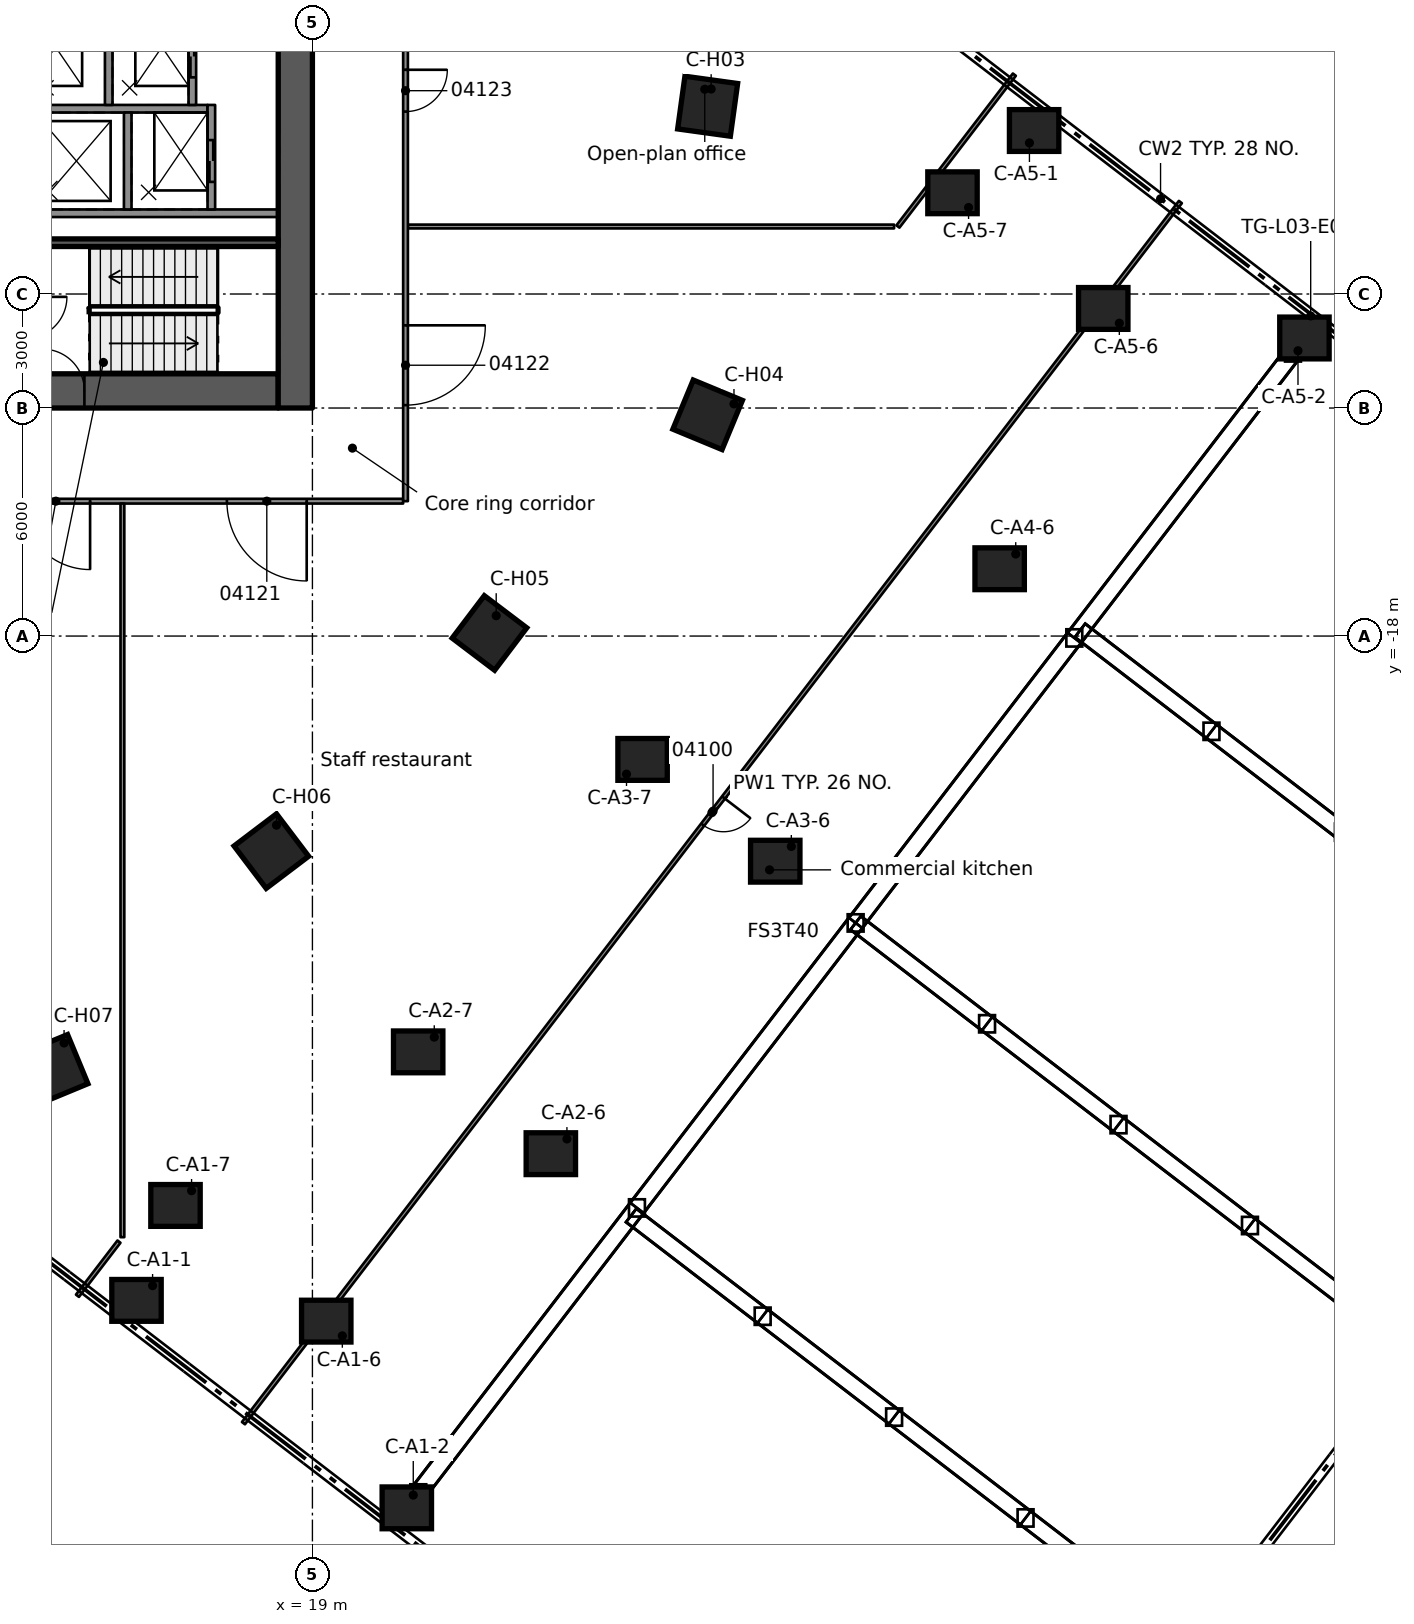
"""IFC4 building model, lengths in metres.
Left out: names, types, materials, properties, quantities, classifications, styles, units other than length and angle.
Written with IfcOpenShell. Run it as: python <this file> out.ifc"""

import sys

from ifc_helpers import new_model, si_unit, direction, frame, frame_2d, origin, origin_2d, place, context, subcontext, project, spatial, rectangle, extrude, element, fill, save


model = new_model("IFC4")
c1 = context("Model", 3, precision=1e-05, world=origin(), true_north=direction((0.0, 1.0)))
c2 = subcontext(c1, "Body", "Model", "MODEL_VIEW")
j1 = project(units=[si_unit("LENGTHUNIT", "METRE"), si_unit("PLANEANGLEUNIT", "RADIAN")], contexts=[c1])
p1 = place(None, origin())
s1 = spatial("IfcSite", under=j1, at=p1, CompositionType="ELEMENT")
p2 = place(p1, origin())
s2 = spatial("IfcBuilding", under=s1, at=p2, CompositionType="ELEMENT")
p3 = place(p2, frame((0.0, 0.0, 20.5)))
s3 = spatial("IfcBuildingStorey", under=s2, at=p3, CompositionType="ELEMENT", Elevation=20.5)
p4 = place(p3, frame((8.9, -11.55, 0.0), z_axis=(0.0, 0.0, 1.0), x_axis=(1.0, 0.0, 0.0)))
e1 = element("IfcWall", 1, at=p4, inside=s3, PredefinedType="SHEAR", context=c2, shape_type="SweptSolid", body=[
    extrude(rectangle(XDim=9.2, YDim=0.9, at=frame_2d((4.6, 0.0))), origin(), (0.0, 0.0, 1.0), 4.6),
])
p5 = place(p4, frame((3.0, 0.0, 0.0)))
e2 = element("IfcOpeningElement", 2, at=p5, cuts=e1, PredefinedType="OPENING", context=c2, shape_type="SweptSolid", body=[
    extrude(rectangle(XDim=1.1, YDim=2.1, at=frame_2d((0.55, 1.05))), frame((0.0, 0.46, 0.0), z_axis=(0.0, -1.0, 0.0), x_axis=(1.0, 0.0, 0.0)), (0.0, 0.0, 1.0), 0.92),
])
p6 = place(p3, frame((18.55, -12.0, 0.0), z_axis=(0.0, 0.0, 1.0), x_axis=(0.0, 1.0, 0.0)))
e3 = element("IfcWall", 3, at=p6, inside=s3, PredefinedType="SHEAR", context=c2, shape_type="SweptSolid", body=[
    extrude(rectangle(XDim=24.0, YDim=0.9, at=frame_2d((12.0, 0.0))), origin(), (0.0, 0.0, 1.0), 4.6),
])
p7 = place(p6, frame((12.1, 0.0, 0.0)))
e4 = element("IfcOpeningElement", 4, at=p7, cuts=e3, PredefinedType="OPENING", context=c2, shape_type="SweptSolid", body=[
    extrude(rectangle(XDim=1.8, YDim=2.1, at=frame_2d((0.9, 1.05))), frame((0.0, 0.46, 0.0), z_axis=(0.0, -1.0, 0.0), x_axis=(1.0, 0.0, 0.0)), (0.0, 0.0, 1.0), 0.92),
])
for number, where, z_axis, x_axis in (
    (5, (14.371, -35.48, 0.0), (0.0, 0.0, 1.0), (1.0, 0.0, 0.0)),
    (6, (21.484, -40.939, 0.0), (0.0, 0.0, 1.0), (1.0, 0.0, 0.0)),
    (7, (19.364, -36.026, 0.0), (0.0, 0.0, 1.0), (1.0, 0.0, 0.0)),
    (8, (15.397, -32.982, 0.0), (0.0, 0.0, 1.0), (1.0, 0.0, 0.0)),
    (9, (25.274, -31.62, 0.0), (0.0, 0.0, 1.0), (1.0, 0.0, 0.0)),
    (10, (21.783, -28.941, 0.0), (0.0, 0.0, 1.0), (1.0, 0.0, 0.0)),
    (11, (31.179, -23.924, 0.0), (0.0, 0.0, 1.0), (1.0, 0.0, 0.0)),
    (12, (27.688, -21.246, 0.0), (0.0, 0.0, 1.0), (1.0, 0.0, 0.0)),
    (13, (37.084, -16.229, 0.0), (0.0, 0.0, 1.0), (1.0, 0.0, 0.0)),
    (14, (37.991, -4.698, 0.0), (0.0, 0.0, 1.0), (1.0, 0.0, 0.0)),
    (15, (45.104, -10.157, 0.0), (0.0, 0.0, 1.0), (1.0, 0.0, 0.0)),
    (16, (39.81, -9.38, 0.0), (0.0, 0.0, 1.0), (1.0, 0.0, 0.0)),
    (17, (35.843, -6.336, 0.0), (0.0, 0.0, 1.0), (1.0, 0.0, 0.0)),
):
    element("IfcColumn", number, at=place(p3, frame(where, z_axis=z_axis, x_axis=x_axis)), inside=s3, PredefinedType="COLUMN", context=c2, shape_type="SweptSolid", body=[
        extrude(rectangle(XDim=1.3, YDim=1.1, at=origin_2d()), origin(), (0.0, 0.0, 1.0), 4.6),
    ])
for number, where, z_axis, x_axis in (
    (18, (29.4, -4.059, 0.0), (0.0, 0.0, 1.0), (0.991, -0.137, 0.0)),
    (19, (29.4, -12.178, 0.0), (0.0, 0.0, 1.0), (0.924, -0.383, 0.0)),
    (20, (23.659, -17.919, 0.0), (0.0, 0.0, 1.0), (0.797, -0.604, 0.0)),
    (21, (17.919, -23.659, 0.0), (0.0, 0.0, 1.0), (0.604, -0.797, 0.0)),
    (22, (12.178, -29.4, 0.0), (0.0, 0.0, 1.0), (0.383, -0.924, 0.0)),
):
    element("IfcColumn", number, at=place(p3, frame(where, z_axis=z_axis, x_axis=x_axis)), inside=s3, PredefinedType="COLUMN", context=c2, shape_type="SweptSolid", body=[
        extrude(rectangle(XDim=1.4, YDim=1.4, at=origin_2d()), origin(), (0.0, 0.0, 1.0), 4.6),
    ])
p8 = place(p3, frame((11.54, -6.875, 0.0), z_axis=(0.0, 0.0, 1.0), x_axis=(1.0, 0.0, 0.0)))
e23 = element("IfcWall", 23, at=p8, inside=s3, PredefinedType="SOLIDWALL", context=c2, shape_type="SweptSolid", body=[
    extrude(rectangle(XDim=6.56, YDim=0.2, at=frame_2d((3.28, 0.0))), origin(), (0.0, 0.0, 1.0), 4.18),
])
p9 = place(p3, frame((11.54, -4.125, 0.0), z_axis=(0.0, 0.0, 1.0), x_axis=(1.0, 0.0, 0.0)))
e24 = element("IfcWall", 24, at=p9, inside=s3, PredefinedType="SOLIDWALL", context=c2, shape_type="SweptSolid", body=[
    extrude(rectangle(XDim=4.7, YDim=0.2, at=frame_2d((2.35, 0.0))), origin(), (0.0, 0.0, 1.0), 4.18),
])
for number, where, z_axis, x_axis in (
    (25, (13.64, -1.475, 0.0), (0.0, 0.0, 1.0), (0.0, -1.0, 0.0)),
    (26, (14.14, -4.225, 0.0), (0.0, 0.0, 1.0), (0.0, -1.0, 0.0)),
):
    element("IfcWall", number, at=place(p3, frame(where, z_axis=z_axis, x_axis=x_axis)), inside=s3, PredefinedType="SOLIDWALL", context=c2, shape_type="SweptSolid", body=[
        extrude(rectangle(XDim=2.55, YDim=0.2, at=frame_2d((1.275, 0.0))), origin(), (0.0, 0.0, 1.0), 4.18),
    ])
p10 = place(p3, frame((15.84, 4.025, 0.0), z_axis=(0.0, 0.0, 1.0), x_axis=(0.0, -1.0, 0.0)))
e27 = element("IfcWall", 27, at=p10, inside=s3, PredefinedType="SOLIDWALL", context=c2, shape_type="SweptSolid", body=[
    extrude(rectangle(XDim=8.05, YDim=0.2, at=frame_2d((4.025, 0.0))), origin(), (0.0, 0.0, 1.0), 4.18),
])
p11 = place(p10, frame((3.475, 0.0, 0.0)))
e28 = element("IfcOpeningElement", 28, at=p11, cuts=e27, PredefinedType="OPENING", context=c2, shape_type="SweptSolid", body=[
    extrude(rectangle(XDim=1.1, YDim=2.1, at=frame_2d((0.55, 1.05))), frame((0.0, 0.11, 0.0), z_axis=(0.0, -1.0, 0.0), x_axis=(1.0, 0.0, 0.0)), (0.0, 0.0, 1.0), 0.22),
])
p12 = place(p10, frame((6.225, 0.0, 0.0)))
e29 = element("IfcOpeningElement", 29, at=p12, cuts=e27, PredefinedType="OPENING", context=c2, shape_type="SweptSolid", body=[
    extrude(rectangle(XDim=1.1, YDim=2.1, at=frame_2d((0.55, 1.05))), frame((0.0, 0.11, 0.0), z_axis=(0.0, -1.0, 0.0), x_axis=(1.0, 0.0, 0.0)), (0.0, 0.0, 1.0), 0.22),
])
p13 = place(p3, frame((16.34, -4.025, 0.0), z_axis=(0.0, 0.0, 1.0), x_axis=(0.0, -1.0, 0.0)))
e30 = element("IfcWall", 30, at=p13, inside=s3, PredefinedType="SOLIDWALL", context=c2, shape_type="SweptSolid", body=[
    extrude(rectangle(XDim=2.75, YDim=0.2, at=frame_2d((1.375, 0.0))), origin(), (0.0, 0.0, 1.0), 4.18),
])
p14 = place(p13, frame((0.925, 0.0, 0.0)))
e31 = element("IfcOpeningElement", 31, at=p14, cuts=e30, PredefinedType="OPENING", context=c2, shape_type="SweptSolid", body=[
    extrude(rectangle(XDim=1.1, YDim=2.1, at=frame_2d((0.55, 1.05))), frame((0.0, 0.11, 0.0), z_axis=(0.0, -1.0, 0.0), x_axis=(1.0, 0.0, 0.0)), (0.0, 0.0, 1.0), 0.22),
])
p15 = place(p3, frame((11.54, -7.65, 0.0), z_axis=(0.0, 0.0, 1.0), x_axis=(1.0, 0.0, 0.0)))
e32 = element("IfcWall", 32, at=p15, inside=s3, PredefinedType="SOLIDWALL", context=c2, shape_type="SweptSolid", body=[
    extrude(rectangle(XDim=6.56, YDim=0.2, at=frame_2d((3.28, 0.0))), origin(), (0.0, 0.0, 1.0), 4.18),
])
p16 = place(p3, frame((21.387, -14.451, 0.0), z_axis=(0.0, 0.0, 1.0), x_axis=(-1.0, 0.0, 0.0)))
e33 = element("IfcWall", 33, at=p16, inside=s3, PredefinedType="PARTITIONING", context=c2, shape_type="SweptSolid", body=[
    extrude(rectangle(XDim=10.996, YDim=0.125, at=frame_2d((5.498, 0.0))), origin(), (0.0, 0.0, 1.0), 4.16),
])
p17 = place(p16, frame((8.238, 0.0, 0.0)))
e34 = element("IfcOpeningElement", 34, at=p17, cuts=e33, PredefinedType="OPENING", context=c2, shape_type="SweptSolid", body=[
    extrude(rectangle(XDim=1.8, YDim=2.1, at=frame_2d((0.9, 1.05))), frame((0.0, 0.073, 0.0), z_axis=(0.0, -1.0, 0.0), x_axis=(1.0, 0.0, 0.0)), (0.0, 0.0, 1.0), 0.145),
])
p18 = place(p16, frame((2.538, 0.0, 0.0)))
e35 = element("IfcOpeningElement", 35, at=p18, cuts=e33, PredefinedType="OPENING", context=c2, shape_type="SweptSolid", body=[
    extrude(rectangle(XDim=2.1, YDim=2.1, at=frame_2d((1.05, 1.05))), frame((0.0, 0.073, 0.0), z_axis=(0.0, -1.0, 0.0), x_axis=(1.0, 0.0, 0.0)), (0.0, 0.0, 1.0), 0.145),
])
p19 = place(p3, frame((21.512, -7.224, 0.0), z_axis=(0.0, 0.0, 1.0), x_axis=(1.0, 0.0, 0.0)))
e36 = element("IfcWall", 36, at=p19, inside=s3, PredefinedType="PARTITIONING", context=c2, shape_type="SweptSolid", body=[
    extrude(rectangle(XDim=12.794, YDim=0.1, at=frame_2d((6.397, 0.0))), origin(), (0.0, 0.0, 1.0), 4.16),
])
p20 = place(p3, frame((41.84, -6.58, 0.0), z_axis=(0.0, 0.0, 1.0), x_axis=(-0.608763818445, -0.793351506807, 0.0)))
e37 = element("IfcWall", 37, at=p20, inside=s3, PredefinedType="PARTITIONING", context=c2, shape_type="SweptSolid", body=[
    extrude(rectangle(XDim=40.5, YDim=0.1, at=frame_2d((20.25, 0.0))), origin(), (0.0, 0.0, 1.0), 4.16),
])
p21 = place(p20, frame((19.75, 0.0, 0.0)))
e38 = element("IfcOpeningElement", 38, at=p21, cuts=e37, PredefinedType="OPENING", context=c2, shape_type="SweptSolid", body=[
    extrude(rectangle(XDim=0.9, YDim=2.1, at=frame_2d((0.45, 1.05))), frame((0.0, 0.06, 0.0), z_axis=(0.0, -1.0, 0.0), x_axis=(1.0, 0.0, 0.0)), (0.0, 0.0, 1.0), 0.12),
])
p22 = place(p3, frame((12.817, -35.359, 0.0), z_axis=(0.0, 0.0, 1.0), x_axis=(0.608665559583, 0.793426894287, 0.0)))
e39 = element("IfcWall", 39, at=p22, inside=s3, PredefinedType="PARTITIONING", context=c2, shape_type="SweptSolid", body=[
    extrude(rectangle(XDim=1.796, YDim=0.1, at=frame_2d((0.898, 0.0))), origin(), (0.0, 0.0, 1.0), 4.16),
])
p23 = place(p3, frame((34.407, -7.224, 0.0), z_axis=(0.0, 0.0, 1.0), x_axis=(0.608468185558, 0.793578267825, 0.0)))
e40 = element("IfcWall", 40, at=p23, inside=s3, PredefinedType="PARTITIONING", context=c2, shape_type="SweptSolid", body=[
    extrude(rectangle(XDim=5.036, YDim=0.1, at=frame_2d((2.518, 0.0))), origin(), (0.0, 0.0, 1.0), 4.16),
])
p24 = place(p3, frame((21.45, 14.451, 0.0), z_axis=(0.0, 0.0, 1.0), x_axis=(0.0, -1.0, 0.0)))
e41 = element("IfcWall", 41, at=p24, inside=s3, PredefinedType="PARTITIONING", context=c2, shape_type="SweptSolid", body=[
    extrude(rectangle(XDim=28.902, YDim=0.125, at=frame_2d((14.451, 0.0))), origin(), (0.0, 0.0, 1.0), 4.16),
])
p25 = place(p24, frame((24.275, 0.0, 0.0)))
e42 = element("IfcOpeningElement", 42, at=p25, cuts=e41, PredefinedType="OPENING", context=c2, shape_type="SweptSolid", body=[
    extrude(rectangle(XDim=2.1, YDim=2.1, at=frame_2d((1.05, 1.05))), frame((0.0, 0.073, 0.0), z_axis=(0.0, -1.0, 0.0), x_axis=(1.0, 0.0, 0.0)), (0.0, 0.0, 1.0), 0.145),
])
p26 = place(p24, frame((17.551, 0.0, 0.0)))
e43 = element("IfcOpeningElement", 43, at=p26, cuts=e41, PredefinedType="OPENING", context=c2, shape_type="SweptSolid", body=[
    extrude(rectangle(XDim=1.1, YDim=2.1, at=frame_2d((0.55, 1.05))), frame((0.0, 0.073, 0.0), z_axis=(0.0, -1.0, 0.0), x_axis=(1.0, 0.0, 0.0)), (0.0, 0.0, 1.0), 0.145),
])
p27 = place(p24, frame((3.35, 0.0, 0.0)))
e44 = element("IfcOpeningElement", 44, at=p27, cuts=e41, PredefinedType="OPENING", context=c2, shape_type="SweptSolid", body=[
    extrude(rectangle(XDim=1.8, YDim=2.1, at=frame_2d((0.9, 1.05))), frame((0.0, 0.073, 0.0), z_axis=(0.0, -1.0, 0.0), x_axis=(1.0, 0.0, 0.0)), (0.0, 0.0, 1.0), 0.145),
])
p28 = place(p24, frame((11.052, 0.0, 0.0)))
e45 = element("IfcOpeningElement", 45, at=p28, cuts=e41, PredefinedType="OPENING", context=c2, shape_type="SweptSolid", body=[
    extrude(rectangle(XDim=0.9, YDim=2.1, at=frame_2d((0.45, 1.05))), frame((0.0, 0.073, 0.0), z_axis=(0.0, -1.0, 0.0), x_axis=(1.0, 0.0, 0.0)), (0.0, 0.0, 1.0), 0.145),
])
p29 = place(p3, frame((14.0, -33.817, 0.0), z_axis=(0.0, 0.0, 1.0), x_axis=(0.0, 1.0, 0.0)))
e46 = element("IfcWall", 46, at=p29, inside=s3, PredefinedType="PARTITIONING", context=c2, shape_type="SweptSolid", body=[
    extrude(rectangle(XDim=19.303, YDim=0.1, at=frame_2d((9.651, 0.0))), origin(), (0.0, 0.0, 1.0), 4.16),
])
p30 = place(p12, origin())
e47 = element("IfcDoor", 47, at=p30, inside=s3, OperationType="DOUBLE_DOOR_SLIDING", PredefinedType="DOOR", context=c2, shape_type="SweptSolid", body=[
    extrude(rectangle(XDim=1.1, YDim=2.1, at=frame_2d((0.55, 1.05))), frame((0.0, 0.025, 0.0), z_axis=(0.0, -1.0, 0.0), x_axis=(1.0, 0.0, 0.0)), (0.0, 0.0, 1.0), 0.05),
])
fill(e29, e47)
p31 = place(p14, origin())
e48 = element("IfcDoor", 48, at=p31, inside=s3, OperationType="DOUBLE_DOOR_SLIDING", PredefinedType="DOOR", context=c2, shape_type="SweptSolid", body=[
    extrude(rectangle(XDim=1.1, YDim=2.1, at=frame_2d((0.55, 1.05))), frame((0.0, 0.025, 0.0), z_axis=(0.0, -1.0, 0.0), x_axis=(1.0, 0.0, 0.0)), (0.0, 0.0, 1.0), 0.05),
])
fill(e31, e48)
p32 = place(p5, origin())
e49 = element("IfcDoor", 49, at=p32, inside=s3, OperationType="SINGLE_SWING_LEFT", PredefinedType="DOOR", context=c2, shape_type="SweptSolid", body=[
    extrude(rectangle(XDim=1.1, YDim=2.1, at=frame_2d((0.55, 1.05))), frame((0.0, 0.025, 0.0), z_axis=(0.0, -1.0, 0.0), x_axis=(1.0, 0.0, 0.0)), (0.0, 0.0, 1.0), 0.05),
])
fill(e2, e49)
p33 = place(p21, origin())
e50 = element("IfcDoor", 50, at=p33, inside=s3, OperationType="SINGLE_SWING_LEFT", PredefinedType="DOOR", context=c2, shape_type="SweptSolid", body=[
    extrude(rectangle(XDim=0.9, YDim=2.1, at=frame_2d((0.45, 1.05))), frame((0.0, 0.025, 0.0), z_axis=(0.0, -1.0, 0.0), x_axis=(1.0, 0.0, 0.0)), (0.0, 0.0, 1.0), 0.05),
])
fill(e38, e50)
p34 = place(p17, origin())
e51 = element("IfcDoor", 51, at=p34, inside=s3, OperationType="DOUBLE_DOOR_SINGLE_SWING", PredefinedType="DOOR", context=c2, shape_type="SweptSolid", body=[
    extrude(rectangle(XDim=1.8, YDim=2.1, at=frame_2d((0.9, 1.05))), frame((0.0, 0.025, 0.0), z_axis=(0.0, -1.0, 0.0), x_axis=(1.0, 0.0, 0.0)), (0.0, 0.0, 1.0), 0.05),
])
fill(e34, e51)
p35 = place(p18, origin())
e52 = element("IfcDoor", 52, at=p35, inside=s3, OperationType="DOUBLE_DOOR_SINGLE_SWING", PredefinedType="DOOR", context=c2, shape_type="SweptSolid", body=[
    extrude(rectangle(XDim=2.1, YDim=2.1, at=frame_2d((1.05, 1.05))), frame((0.0, 0.025, 0.0), z_axis=(0.0, -1.0, 0.0), x_axis=(1.0, 0.0, 0.0)), (0.0, 0.0, 1.0), 0.05),
])
fill(e35, e52)
p36 = place(p25, origin())
e53 = element("IfcDoor", 53, at=p36, inside=s3, OperationType="DOUBLE_DOOR_SINGLE_SWING", PredefinedType="DOOR", context=c2, shape_type="SweptSolid", body=[
    extrude(rectangle(XDim=2.1, YDim=2.1, at=frame_2d((1.05, 1.05))), frame((0.0, 0.025, 0.0), z_axis=(0.0, -1.0, 0.0), x_axis=(1.0, 0.0, 0.0)), (0.0, 0.0, 1.0), 0.05),
])
fill(e42, e53)
p37 = place(p26, origin())
e54 = element("IfcDoor", 54, at=p37, inside=s3, OperationType="SINGLE_SWING_RIGHT", PredefinedType="DOOR", context=c2, shape_type="SweptSolid", body=[
    extrude(rectangle(XDim=1.1, YDim=2.1, at=frame_2d((0.55, 1.05))), frame((0.0, 0.025, 0.0), z_axis=(0.0, -1.0, 0.0), x_axis=(1.0, 0.0, 0.0)), (0.0, 0.0, 1.0), 0.05),
])
fill(e43, e54)
save(model, sys.argv[1])
